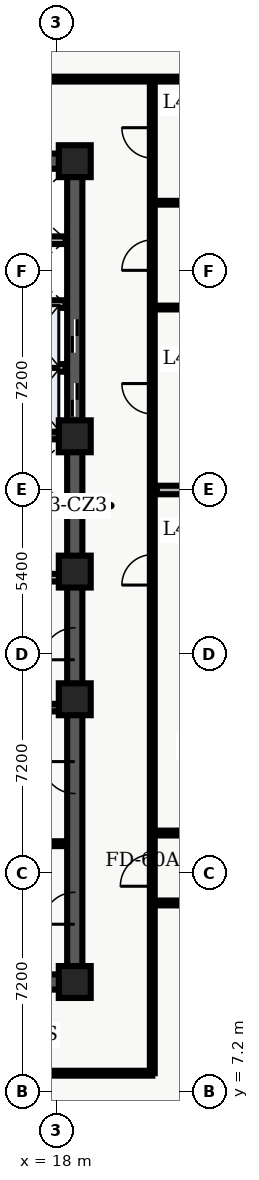
"""IFC4 building model, lengths in metres.
Left out: names, types, materials, properties, quantities, classifications, styles, units other than length and angle.
Written with IfcOpenShell. Run it as: python <this file> out.ifc"""

import sys

from ifc_helpers import new_model, entity, si_unit, converted_unit, direction, frame, origin_with_axes, origin_2d_with_axis, place, context, subcontext, project, spatial, polyline, rectangle, outline, extrude, element, fill, save


model = new_model("IFC4")
c1 = context("Model", 3, precision=1e-05, world=origin_with_axes(), true_north=direction((0.0, 1.0)))
c2 = subcontext(c1, "Body", "Model", "MODEL_VIEW")
j1 = project(units=[si_unit("LENGTHUNIT", "METRE"), converted_unit("PLANEANGLEUNIT", "DEGREE", entity("IfcPlaneAngleMeasure", 0.017), si_unit("PLANEANGLEUNIT", "RADIAN"), dimensions=[0, 0, 0, 0, 0, 0, 0])], contexts=[c1])
p1 = place(None, origin_with_axes())
s1 = spatial("IfcSite", under=j1, at=p1, CompositionType="ELEMENT")
p2 = place(p1, origin_with_axes())
s2 = spatial("IfcBuilding", under=s1, at=p2, CompositionType="ELEMENT")
p3 = place(p2, frame((0.0, 0.0, 175.8), z_axis=(0.0, 0.0, 1.0), x_axis=(1.0, 0.0, 0.0)))
s3 = spatial("IfcBuildingStorey", under=s2, at=p3, CompositionType="ELEMENT", Elevation=175.8)
p4 = place(p3, frame((11.4, 10.8, 0.0), z_axis=(0.0, 0.0, 1.0), x_axis=(1.0, 0.0, 0.0)))
e1 = element("IfcWall", 1, at=p4, inside=s3, PredefinedType="SHEAR", context=c2, shape_type="SweptSolid", body=[
    extrude(outline(polyline([(0.0, -0.25), (7.2, -0.25), (7.2, 0.25), (0.0, 0.25), (0.0, -0.25)])), origin_with_axes(), (0.0, 0.0, 1.0), 3.66),
])
p5 = place(p4, frame((2.625, 0.0, 0.0), z_axis=(0.0, 0.0, 1.0), x_axis=(1.0, 0.0, 0.0)))
e2 = element("IfcOpeningElement", 2, at=p5, cuts=e1, PredefinedType="OPENING", context=c2, shape_type="SweptSolid", body=[
    extrude(rectangle(XDim=1.05, YDim=0.52, at=origin_2d_with_axis()), origin_with_axes(), (0.0, 0.0, 1.0), 2.15),
])
p6 = place(p3, frame((11.4, 37.8, 0.0), z_axis=(0.0, 0.0, 1.0), x_axis=(1.0, 0.0, 0.0)))
e3 = element("IfcWall", 3, at=p6, inside=s3, PredefinedType="SHEAR", context=c2, shape_type="SweptSolid", body=[
    extrude(outline(polyline([(0.0, -0.25), (7.2, -0.25), (7.2, 0.25), (0.0, 0.25), (0.0, -0.25)])), origin_with_axes(), (0.0, 0.0, 1.0), 3.66),
])
p7 = place(p6, frame((2.625, 0.0, 0.0), z_axis=(0.0, 0.0, 1.0), x_axis=(1.0, 0.0, 0.0)))
e4 = element("IfcOpeningElement", 4, at=p7, cuts=e3, PredefinedType="OPENING", context=c2, shape_type="SweptSolid", body=[
    extrude(rectangle(XDim=1.05, YDim=0.52, at=origin_2d_with_axis()), origin_with_axes(), (0.0, 0.0, 1.0), 2.15),
])
p8 = place(p3, frame((18.6, 10.8, 0.0), z_axis=(0.0, 0.0, 1.0), x_axis=(0.0, 1.0, 0.0)))
e5 = element("IfcWall", 5, at=p8, inside=s3, PredefinedType="SHEAR", context=c2, shape_type="SweptSolid", body=[
    extrude(outline(polyline([(0.0, -0.25), (13.5, -0.25), (13.5, 0.25), (0.0, 0.25), (0.0, -0.25)])), origin_with_axes(), (0.0, 0.0, 1.0), 3.66),
])
p9 = place(p8, frame((11.125, 0.0, 0.0), z_axis=(0.0, 0.0, 1.0), x_axis=(1.0, 0.0, 0.0)))
e6 = element("IfcOpeningElement", 6, at=p9, cuts=e5, PredefinedType="OPENING", context=c2, shape_type="SweptSolid", body=[
    extrude(rectangle(XDim=1.05, YDim=0.52, at=origin_2d_with_axis()), origin_with_axes(), (0.0, 0.0, 1.0), 2.15),
])
p10 = place(p8, frame((2.425, 0.0, 0.0), z_axis=(0.0, 0.0, 1.0), x_axis=(1.0, 0.0, 0.0)))
e7 = element("IfcOpeningElement", 7, at=p10, cuts=e5, PredefinedType="OPENING", context=c2, shape_type="SweptSolid", body=[
    extrude(rectangle(XDim=1.05, YDim=0.52, at=origin_2d_with_axis()), origin_with_axes(), (0.0, 0.0, 1.0), 2.15),
])
p11 = place(p8, frame((6.725, 0.0, 0.0), z_axis=(0.0, 0.0, 1.0), x_axis=(1.0, 0.0, 0.0)))
e8 = element("IfcOpeningElement", 8, at=p11, cuts=e5, PredefinedType="OPENING", context=c2, shape_type="SweptSolid", body=[
    extrude(rectangle(XDim=1.05, YDim=0.52, at=origin_2d_with_axis()), origin_with_axes(), (0.0, 0.0, 1.0), 2.15),
])
p12 = place(p3, frame((18.6, 24.3, 0.0), z_axis=(0.0, 0.0, 1.0), x_axis=(0.0, 1.0, 0.0)))
e9 = element("IfcWall", 9, at=p12, inside=s3, PredefinedType="SHEAR", context=c2, shape_type="SweptSolid", body=[
    extrude(outline(polyline([(0.0, -0.25), (13.5, -0.25), (13.5, 0.25), (0.0, 0.25), (0.0, -0.25)])), origin_with_axes(), (0.0, 0.0, 1.0), 3.66),
])
p13 = place(p12, frame((5.65, 0.0, 0.0), z_axis=(0.0, 0.0, 1.0), x_axis=(1.0, 0.0, 0.0)))
e10 = element("IfcOpeningElement", 10, at=p13, cuts=e9, PredefinedType="OPENING", context=c2, shape_type="SweptSolid", body=[
    extrude(rectangle(XDim=1.1, YDim=0.52, at=origin_2d_with_axis()), origin_with_axes(), (0.0, 0.0, 1.0), 2.15),
])
p14 = place(p12, frame((7.75, 0.0, 0.0), z_axis=(0.0, 0.0, 1.0), x_axis=(1.0, 0.0, 0.0)))
e11 = element("IfcOpeningElement", 11, at=p14, cuts=e9, PredefinedType="OPENING", context=c2, shape_type="SweptSolid", body=[
    extrude(rectangle(XDim=1.1, YDim=0.52, at=origin_2d_with_axis()), origin_with_axes(), (0.0, 0.0, 1.0), 2.15),
])
for number, where, z_axis, x_axis in (
    (12, (11.65, 19.825, 0.0), (0.0, 0.0, 1.0), (1.0, 0.0, 0.0)),
    (13, (11.65, 28.775, 0.0), (0.0, 0.0, 1.0), (1.0, 0.0, 0.0)),
):
    element("IfcWall", number, at=place(p3, frame(where, z_axis=z_axis, x_axis=x_axis)), inside=s3, PredefinedType="SHEAR", context=c2, shape_type="SweptSolid", body=[
        extrude(outline(polyline([(0.0, -0.125), (6.7, -0.125), (6.7, 0.125), (0.0, 0.125), (0.0, -0.125)])), origin_with_axes(), (0.0, 0.0, 1.0), 3.66),
    ])
p15 = place(p3, frame((11.7, 24.1, 0.0), z_axis=(0.0, 0.0, 1.0), x_axis=(1.0, 0.0, 0.0)))
e14 = element("IfcWall", 14, at=p15, inside=s3, PredefinedType="SOLIDWALL", context=c2, shape_type="SweptSolid", body=[
    extrude(outline(polyline([(0.0, -0.125), (6.6, -0.125), (6.6, 0.125), (0.0, 0.125), (0.0, -0.125)])), origin_with_axes(), (0.0, 0.0, 1.0), 2.7),
])
p16 = place(p15, frame((3.6, 0.0, 0.0), z_axis=(0.0, 0.0, 1.0), x_axis=(1.0, 0.0, 0.0)))
e15 = element("IfcOpeningElement", 15, at=p16, cuts=e14, PredefinedType="OPENING", context=c2, shape_type="SweptSolid", body=[
    extrude(rectangle(XDim=0.9, YDim=0.27, at=origin_2d_with_axis()), origin_with_axes(), (0.0, 0.0, 1.0), 2.15),
])
p17 = place(p15, frame((5.65, 0.0, 0.0), z_axis=(0.0, 0.0, 1.0), x_axis=(1.0, 0.0, 0.0)))
e16 = element("IfcOpeningElement", 16, at=p17, cuts=e14, PredefinedType="OPENING", context=c2, shape_type="SweptSolid", body=[
    extrude(rectangle(XDim=0.9, YDim=0.27, at=origin_2d_with_axis()), origin_with_axes(), (0.0, 0.0, 1.0), 2.15),
])
p18 = place(p3, frame((11.7, 26.325, 0.0), z_axis=(0.0, 0.0, 1.0), x_axis=(1.0, 0.0, 0.0)))
e17 = element("IfcWall", 17, at=p18, inside=s3, PredefinedType="SOLIDWALL", context=c2, shape_type="SweptSolid", body=[
    extrude(outline(polyline([(0.0, -0.125), (6.6, -0.125), (6.6, 0.125), (0.0, 0.125), (0.0, -0.125)])), origin_with_axes(), (0.0, 0.0, 1.0), 2.7),
])
p19 = place(p18, frame((3.5, 0.0, 0.0), z_axis=(0.0, 0.0, 1.0), x_axis=(1.0, 0.0, 0.0)))
e18 = element("IfcOpeningElement", 18, at=p19, cuts=e17, PredefinedType="OPENING", context=c2, shape_type="SweptSolid", body=[
    extrude(rectangle(XDim=0.9, YDim=0.27, at=origin_2d_with_axis()), origin_with_axes(), (0.0, 0.0, 1.0), 2.15),
])
for number, where, z_axis, x_axis in (
    (19, (18.6, 10.8, 0.0), (0.0, 0.0, 1.0), (1.0, 0.0, 0.0)),
    (20, (18.6, 20.1, 0.0), (0.0, 0.0, 1.0), (1.0, 0.0, 0.0)),
    (21, (18.6, 24.3, 0.0), (0.0, 0.0, 1.0), (1.0, 0.0, 0.0)),
    (22, (18.6, 28.75, 0.0), (0.0, 0.0, 1.0), (1.0, 0.0, 0.0)),
    (23, (18.6, 37.8, 0.0), (0.0, 0.0, 1.0), (1.0, 0.0, 0.0)),
):
    element("IfcColumn", number, at=place(p3, frame(where, z_axis=z_axis, x_axis=x_axis)), inside=s3, PredefinedType="COLUMN", context=c2, shape_type="SweptSolid", body=[
        extrude(rectangle(XDim=1.05, YDim=1.05, at=origin_2d_with_axis()), origin_with_axes(), (0.0, 0.0, 1.0), 3.9),
    ])
p20 = place(p3, frame((15.84, 15.35, 0.0), z_axis=(0.0, 0.0, 1.0), x_axis=(1.0, 0.0, 0.0)))
e24 = element("IfcWall", 24, at=p20, inside=s3, PredefinedType="PARTITIONING", context=c2, shape_type="SweptSolid", body=[
    extrude(outline(polyline([(0.0, -0.08), (2.46, -0.08), (2.46, 0.08), (0.0, 0.08), (0.0, -0.08)])), origin_with_axes(), (0.0, 0.0, 1.0), 2.7),
])
for number, where, z_axis, x_axis in (
    (25, (15.84, 31.0, 0.0), (0.0, 0.0, 1.0), (1.0, 0.0, 0.0)),
    (26, (15.84, 33.1, 0.0), (0.0, 0.0, 1.0), (1.0, 0.0, 0.0)),
    (27, (15.84, 35.2, 0.0), (0.0, 0.0, 1.0), (1.0, 0.0, 0.0)),
):
    element("IfcWall", number, at=place(p3, frame(where, z_axis=z_axis, x_axis=x_axis)), inside=s3, PredefinedType="SOLIDWALL", context=c2, shape_type="SweptSolid", body=[
        extrude(outline(polyline([(0.0, -0.125), (2.46, -0.125), (2.46, 0.125), (0.0, 0.125), (0.0, -0.125)])), origin_with_axes(), (0.0, 0.0, 1.0), 2.7),
    ])
p21 = place(p3, frame((2.6, 7.8, 0.0), z_axis=(0.0, 0.0, 1.0), x_axis=(1.0, 0.0, 0.0)))
e28 = element("IfcWall", 28, at=p21, inside=s3, PredefinedType="PARTITIONING", context=c2, shape_type="SweptSolid", body=[
    extrude(outline(polyline([(0.0, -0.08), (18.55, -0.08), (18.55, 0.08), (0.0, 0.08), (0.0, -0.08)])), origin_with_axes(), (0.0, 0.0, 1.0), 2.7),
])
p22 = place(p21, frame((9.245, 0.0, 0.0), z_axis=(0.0, 0.0, 1.0), x_axis=(1.0, 0.0, 0.0)))
e29 = element("IfcOpeningElement", 29, at=p22, cuts=e28, PredefinedType="OPENING", context=c2, shape_type="SweptSolid", body=[
    extrude(rectangle(XDim=1.0, YDim=0.18, at=origin_2d_with_axis()), origin_with_axes(), (0.0, 0.0, 1.0), 2.15),
])
p23 = place(p3, frame((2.6, 40.5, 0.0), z_axis=(0.0, 0.0, 1.0), x_axis=(1.0, 0.0, 0.0)))
e30 = element("IfcWall", 30, at=p23, inside=s3, PredefinedType="PARTITIONING", context=c2, shape_type="SweptSolid", body=[
    extrude(outline(polyline([(0.0, -0.08), (22.318, -0.08), (22.318, 0.08), (0.0, 0.08), (0.0, -0.08)])), origin_with_axes(), (0.0, 0.0, 1.0), 2.7),
])
p24 = place(p23, frame((2.368, 0.0, 0.0), z_axis=(0.0, 0.0, 1.0), x_axis=(1.0, 0.0, 0.0)))
e31 = element("IfcOpeningElement", 31, at=p24, cuts=e30, PredefinedType="OPENING", context=c2, shape_type="SweptSolid", body=[
    extrude(rectangle(XDim=1.0, YDim=0.18, at=origin_2d_with_axis()), origin_with_axes(), (0.0, 0.0, 1.0), 2.15),
])
p25 = place(p23, frame((7.617, 0.0, 0.0), z_axis=(0.0, 0.0, 1.0), x_axis=(1.0, 0.0, 0.0)))
e32 = element("IfcOpeningElement", 32, at=p25, cuts=e30, PredefinedType="OPENING", context=c2, shape_type="SweptSolid", body=[
    extrude(rectangle(XDim=1.0, YDim=0.18, at=origin_2d_with_axis()), origin_with_axes(), (0.0, 0.0, 1.0), 2.15),
])
p26 = place(p23, frame((14.004, 0.0, 0.0), z_axis=(0.0, 0.0, 1.0), x_axis=(1.0, 0.0, 0.0)))
e33 = element("IfcOpeningElement", 33, at=p26, cuts=e30, PredefinedType="OPENING", context=c2, shape_type="SweptSolid", body=[
    extrude(rectangle(XDim=1.0, YDim=0.18, at=origin_2d_with_axis()), origin_with_axes(), (0.0, 0.0, 1.0), 2.15),
])
p27 = place(p3, frame((21.15, 7.8, 0.0), z_axis=(0.0, 0.0, 1.0), x_axis=(0.0, 1.0, 0.0)))
e34 = element("IfcWall", 34, at=p27, inside=s3, PredefinedType="PARTITIONING", context=c2, shape_type="SweptSolid", body=[
    extrude(outline(polyline([(0.0, -0.08), (32.7, -0.08), (32.7, 0.08), (0.0, 0.08), (0.0, -0.08)])), origin_with_axes(), (0.0, 0.0, 1.0), 2.7),
])
p28 = place(p27, frame((16.557, 0.0, 0.0), z_axis=(0.0, 0.0, 1.0), x_axis=(1.0, 0.0, 0.0)))
e35 = element("IfcOpeningElement", 35, at=p28, cuts=e34, PredefinedType="OPENING", context=c2, shape_type="SweptSolid", body=[
    extrude(rectangle(XDim=1.0, YDim=0.18, at=origin_2d_with_axis()), origin_with_axes(), (0.0, 0.0, 1.0), 2.15),
])
p29 = place(p27, frame((22.185, 0.0, 0.0), z_axis=(0.0, 0.0, 1.0), x_axis=(1.0, 0.0, 0.0)))
e36 = element("IfcOpeningElement", 36, at=p29, cuts=e34, PredefinedType="OPENING", context=c2, shape_type="SweptSolid", body=[
    extrude(rectangle(XDim=1.0, YDim=0.18, at=origin_2d_with_axis()), origin_with_axes(), (0.0, 0.0, 1.0), 2.15),
])
p30 = place(p27, frame((26.91, 0.0, 0.0), z_axis=(0.0, 0.0, 1.0), x_axis=(1.0, 0.0, 0.0)))
e37 = element("IfcOpeningElement", 37, at=p30, cuts=e34, PredefinedType="OPENING", context=c2, shape_type="SweptSolid", body=[
    extrude(rectangle(XDim=1.0, YDim=0.18, at=origin_2d_with_axis()), origin_with_axes(), (0.0, 0.0, 1.0), 2.15),
])
p31 = place(p27, frame((30.602, 0.0, 0.0), z_axis=(0.0, 0.0, 1.0), x_axis=(1.0, 0.0, 0.0)))
e38 = element("IfcOpeningElement", 38, at=p31, cuts=e34, PredefinedType="OPENING", context=c2, shape_type="SweptSolid", body=[
    extrude(rectangle(XDim=1.0, YDim=0.18, at=origin_2d_with_axis()), origin_with_axes(), (0.0, 0.0, 1.0), 2.15),
])
p32 = place(p27, frame((6.675, 0.0, 0.0), z_axis=(0.0, 0.0, 1.0), x_axis=(1.0, 0.0, 0.0)))
e39 = element("IfcOpeningElement", 39, at=p32, cuts=e34, PredefinedType="OPENING", context=c2, shape_type="SweptSolid", body=[
    extrude(rectangle(XDim=1.05, YDim=0.18, at=origin_2d_with_axis()), origin_with_axes(), (0.0, 0.0, 1.0), 2.15),
])
p33 = place(p3, frame((21.3, 26.984, 0.0), z_axis=(0.0, 0.0, 1.0), x_axis=(1.0, 0.0, 0.0)))
e40 = element("IfcWall", 40, at=p33, inside=s3, PredefinedType="PARTITIONING", context=c2, shape_type="SweptSolid", body=[
    extrude(outline(polyline([(0.0, -0.14), (3.618, -0.14), (3.618, 0.14), (0.0, 0.14), (0.0, -0.14)])), origin_with_axes(), (0.0, 0.0, 1.0), 2.7),
])
for number, where, z_axis, x_axis in (
    (41, (21.3, 32.986, 0.0), (0.0, 0.0, 1.0), (1.0, 0.0, 0.0)),
    (42, (21.3, 36.433, 0.0), (0.0, 0.0, 1.0), (1.0, 0.0, 0.0)),
):
    element("IfcWall", number, at=place(p3, frame(where, z_axis=z_axis, x_axis=x_axis)), inside=s3, PredefinedType="PARTITIONING", context=c2, shape_type="SweptSolid", body=[
        extrude(outline(polyline([(0.0, -0.062), (3.618, -0.062), (3.618, 0.062), (0.0, 0.062), (0.0, -0.062)])), origin_with_axes(), (0.0, 0.0, 1.0), 2.7),
    ])
p34 = place(p3, frame((21.15, 13.4, 0.0), z_axis=(0.0, 0.0, 1.0), x_axis=(1.0, 0.0, 0.0)))
e43 = element("IfcWall", 43, at=p34, inside=s3, PredefinedType="PARTITIONING", context=c2, shape_type="SweptSolid", body=[
    extrude(outline(polyline([(0.0, -0.08), (15.2, -0.08), (15.2, 0.08), (0.0, 0.08), (0.0, -0.08)])), origin_with_axes(), (0.0, 0.0, 1.0), 2.7),
])
p35 = place(p34, frame((7.65, 0.0, 0.0), z_axis=(0.0, 0.0, 1.0), x_axis=(1.0, 0.0, 0.0)))
e44 = element("IfcOpeningElement", 44, at=p35, cuts=e43, PredefinedType="OPENING", context=c2, shape_type="SweptSolid", body=[
    extrude(rectangle(XDim=1.2, YDim=0.18, at=origin_2d_with_axis()), origin_with_axes(), (0.0, 0.0, 1.0), 2.2),
])
p36 = place(p3, frame((21.15, 15.7, 0.0), z_axis=(0.0, 0.0, 1.0), x_axis=(1.0, 0.0, 0.0)))
e45 = element("IfcWall", 45, at=p36, inside=s3, PredefinedType="PARTITIONING", context=c2, shape_type="SweptSolid", body=[
    extrude(outline(polyline([(0.0, -0.08), (15.2, -0.08), (15.2, 0.08), (0.0, 0.08), (0.0, -0.08)])), origin_with_axes(), (0.0, 0.0, 1.0), 2.7),
])
p37 = place(p36, frame((2.31, 0.0, 0.0), z_axis=(0.0, 0.0, 1.0), x_axis=(1.0, 0.0, 0.0)))
e46 = element("IfcOpeningElement", 46, at=p37, cuts=e45, PredefinedType="OPENING", context=c2, shape_type="SweptSolid", body=[
    extrude(rectangle(XDim=1.0, YDim=0.18, at=origin_2d_with_axis()), origin_with_axes(), (0.0, 0.0, 1.0), 2.15),
])
p38 = place(p36, frame((6.909, 0.0, 0.0), z_axis=(0.0, 0.0, 1.0), x_axis=(1.0, 0.0, 0.0)))
e47 = element("IfcOpeningElement", 47, at=p38, cuts=e45, PredefinedType="OPENING", context=c2, shape_type="SweptSolid", body=[
    extrude(rectangle(XDim=1.0, YDim=0.18, at=origin_2d_with_axis()), origin_with_axes(), (0.0, 0.0, 1.0), 2.15),
])
p39 = place(p36, frame((12.249, 0.0, 0.0), z_axis=(0.0, 0.0, 1.0), x_axis=(1.0, 0.0, 0.0)))
e48 = element("IfcOpeningElement", 48, at=p39, cuts=e45, PredefinedType="OPENING", context=c2, shape_type="SweptSolid", body=[
    extrude(rectangle(XDim=1.0, YDim=0.18, at=origin_2d_with_axis()), origin_with_axes(), (0.0, 0.0, 1.0), 2.15),
])
p40 = place(p12, frame((5.65, 0.0, 0.0), z_axis=(0.0, 0.0, 1.0), x_axis=(1.0, 0.0, 0.0)))
e49 = element("IfcDoor", 49, at=p40, inside=s3, OperationType="SLIDING_TO_LEFT", PredefinedType="DOOR", context=c2, shape_type="SweptSolid", body=[
    extrude(rectangle(XDim=1.1, YDim=0.09, at=origin_2d_with_axis()), origin_with_axes(), (0.0, 0.0, 1.0), 2.15),
])
fill(e10, e49)
p41 = place(p12, frame((7.75, 0.0, 0.0), z_axis=(0.0, 0.0, 1.0), x_axis=(1.0, 0.0, 0.0)))
e50 = element("IfcDoor", 50, at=p41, inside=s3, OperationType="SLIDING_TO_RIGHT", PredefinedType="DOOR", context=c2, shape_type="SweptSolid", body=[
    extrude(rectangle(XDim=1.1, YDim=0.09, at=origin_2d_with_axis()), origin_with_axes(), (0.0, 0.0, 1.0), 2.15),
])
fill(e11, e50)
p42 = place(p8, frame((11.125, 0.0, 0.0), z_axis=(0.0, 0.0, 1.0), x_axis=(1.0, 0.0, 0.0)))
e51 = element("IfcDoor", 51, at=p42, inside=s3, OperationType="SINGLE_SWING_LEFT", PredefinedType="DOOR", context=c2, shape_type="SweptSolid", body=[
    extrude(rectangle(XDim=1.05, YDim=0.09, at=origin_2d_with_axis()), origin_with_axes(), (0.0, 0.0, 1.0), 2.15),
])
fill(e6, e51)
p43 = place(p8, frame((2.425, 0.0, 0.0), z_axis=(0.0, 0.0, 1.0), x_axis=(1.0, 0.0, 0.0)))
e52 = element("IfcDoor", 52, at=p43, inside=s3, OperationType="SINGLE_SWING_LEFT", PredefinedType="DOOR", context=c2, shape_type="SweptSolid", body=[
    extrude(rectangle(XDim=1.05, YDim=0.09, at=origin_2d_with_axis()), origin_with_axes(), (0.0, 0.0, 1.0), 2.15),
])
fill(e7, e52)
p44 = place(p8, frame((6.725, 0.0, 0.0), z_axis=(0.0, 0.0, 1.0), x_axis=(1.0, 0.0, 0.0)))
e53 = element("IfcDoor", 53, at=p44, inside=s3, OperationType="SINGLE_SWING_RIGHT", PredefinedType="DOOR", context=c2, shape_type="SweptSolid", body=[
    extrude(rectangle(XDim=1.05, YDim=0.09, at=origin_2d_with_axis()), origin_with_axes(), (0.0, 0.0, 1.0), 2.15),
])
fill(e8, e53)
p45 = place(p27, frame((16.557, 0.0, 0.0), z_axis=(0.0, 0.0, 1.0), x_axis=(1.0, 0.0, 0.0)))
e54 = element("IfcDoor", 54, at=p45, inside=s3, OperationType="SINGLE_SWING_LEFT", PredefinedType="DOOR", context=c2, shape_type="SweptSolid", body=[
    extrude(rectangle(XDim=1.0, YDim=0.09, at=origin_2d_with_axis()), origin_with_axes(), (0.0, 0.0, 1.0), 2.15),
])
fill(e35, e54)
p46 = place(p27, frame((22.185, 0.0, 0.0), z_axis=(0.0, 0.0, 1.0), x_axis=(1.0, 0.0, 0.0)))
e55 = element("IfcDoor", 55, at=p46, inside=s3, OperationType="SINGLE_SWING_RIGHT", PredefinedType="DOOR", context=c2, shape_type="SweptSolid", body=[
    extrude(rectangle(XDim=1.0, YDim=0.09, at=origin_2d_with_axis()), origin_with_axes(), (0.0, 0.0, 1.0), 2.15),
])
fill(e36, e55)
p47 = place(p27, frame((26.91, 0.0, 0.0), z_axis=(0.0, 0.0, 1.0), x_axis=(1.0, 0.0, 0.0)))
e56 = element("IfcDoor", 56, at=p47, inside=s3, OperationType="SINGLE_SWING_LEFT", PredefinedType="DOOR", context=c2, shape_type="SweptSolid", body=[
    extrude(rectangle(XDim=1.0, YDim=0.09, at=origin_2d_with_axis()), origin_with_axes(), (0.0, 0.0, 1.0), 2.15),
])
fill(e37, e56)
p48 = place(p27, frame((30.602, 0.0, 0.0), z_axis=(0.0, 0.0, 1.0), x_axis=(1.0, 0.0, 0.0)))
e57 = element("IfcDoor", 57, at=p48, inside=s3, OperationType="SINGLE_SWING_RIGHT", PredefinedType="DOOR", context=c2, shape_type="SweptSolid", body=[
    extrude(rectangle(XDim=1.0, YDim=0.09, at=origin_2d_with_axis()), origin_with_axes(), (0.0, 0.0, 1.0), 2.15),
])
fill(e38, e57)
p49 = place(p27, frame((6.675, 0.0, 0.0), z_axis=(0.0, 0.0, 1.0), x_axis=(1.0, 0.0, 0.0)))
e58 = element("IfcDoor", 58, at=p49, inside=s3, OperationType="SINGLE_SWING_LEFT", PredefinedType="DOOR", context=c2, shape_type="SweptSolid", body=[
    extrude(rectangle(XDim=1.05, YDim=0.09, at=origin_2d_with_axis()), origin_with_axes(), (0.0, 0.0, 1.0), 2.15),
])
fill(e39, e58)
save(model, sys.argv[1])
